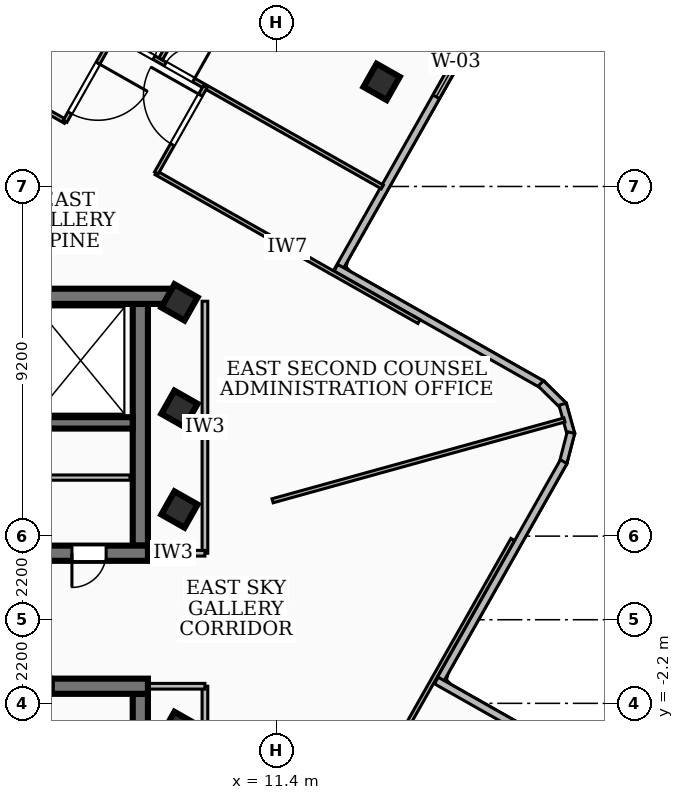
"""IFC4 building model, lengths in metres.
Left out: names, types, materials, properties, quantities, classifications, styles, units other than length and angle.
Written with IfcOpenShell. Run it as: python <this file> out.ifc"""

import sys

from ifc_helpers import new_model, si_unit, direction, frame, frame_2d, origin, origin_2d, place, context, subcontext, project, spatial, rectangle, extrude, element, fill, save


model = new_model("IFC4")
c1 = context("Model", 3, precision=1e-05, world=origin(), true_north=direction((0.0, 1.0)))
c2 = subcontext(c1, "Body", "Model", "MODEL_VIEW")
j1 = project(units=[si_unit("LENGTHUNIT", "METRE"), si_unit("PLANEANGLEUNIT", "RADIAN")], contexts=[c1])
p1 = place(None, origin())
s1 = spatial("IfcSite", under=j1, at=p1, CompositionType="ELEMENT")
p2 = place(p1, origin())
s2 = spatial("IfcBuilding", under=s1, at=p2, CompositionType="ELEMENT")
p3 = place(p2, frame((0.0, 0.0, 281.7)))
s3 = spatial("IfcBuildingStorey", under=s2, at=p3, CompositionType="ELEMENT", Elevation=281.7)
p4 = place(p3, frame((-8.78, 8.51, 0.0), z_axis=(0.0, 0.0, 1.0), x_axis=(1.0, 0.0, 0.0)))
e1 = element("IfcWall", 1, at=p4, inside=s3, PredefinedType="SHEAR", context=c2, shape_type="SweptSolid", body=[
    extrude(rectangle(XDim=17.56, YDim=0.4, at=frame_2d((8.78, 0.0))), origin(), (0.0, 0.0, 1.0), 3.12),
])
p5 = place(p3, frame((8.02, 1.75, 0.0), z_axis=(0.0, 0.0, 1.0), x_axis=(-1.0, 0.0, 0.0)))
e2 = element("IfcWall", 2, at=p5, inside=s3, PredefinedType="SHEAR", context=c2, shape_type="SweptSolid", body=[
    extrude(rectangle(XDim=16.04, YDim=0.4, at=frame_2d((8.02, 0.0))), origin(), (0.0, 0.0, 1.0), 3.12),
])
p6 = place(p5, frame((7.45, 0.0, 0.0)))
e3 = element("IfcOpeningElement", 3, at=p6, cuts=e2, PredefinedType="OPENING", context=c2, shape_type="SweptSolid", body=[
    extrude(rectangle(XDim=1.0, YDim=2.1, at=frame_2d((0.5, 1.05))), frame((0.0, 0.21, 0.0), z_axis=(0.0, -1.0, 0.0), x_axis=(1.0, 0.0, 0.0)), (0.0, 0.0, 1.0), 0.42),
])
p7 = place(p5, frame((14.285, 0.0, 0.0)))
e4 = element("IfcOpeningElement", 4, at=p7, cuts=e2, PredefinedType="OPENING", context=c2, shape_type="SweptSolid", body=[
    extrude(rectangle(XDim=1.05, YDim=2.15, at=frame_2d((0.525, 1.075))), frame((0.0, 0.21, 0.0), z_axis=(0.0, -1.0, 0.0), x_axis=(1.0, 0.0, 0.0)), (0.0, 0.0, 1.0), 0.42),
])
p8 = place(p5, frame((12.725, 0.0, 0.0)))
e5 = element("IfcOpeningElement", 5, at=p8, cuts=e2, PredefinedType="OPENING", context=c2, shape_type="SweptSolid", body=[
    extrude(rectangle(XDim=1.05, YDim=2.15, at=frame_2d((0.525, 1.075))), frame((0.0, 0.21, 0.0), z_axis=(0.0, -1.0, 0.0), x_axis=(1.0, 0.0, 0.0)), (0.0, 0.0, 1.0), 0.42),
])
p9 = place(p5, frame((11.165, 0.0, 0.0)))
e6 = element("IfcOpeningElement", 6, at=p9, cuts=e2, PredefinedType="OPENING", context=c2, shape_type="SweptSolid", body=[
    extrude(rectangle(XDim=1.05, YDim=2.15, at=frame_2d((0.525, 1.075))), frame((0.0, 0.21, 0.0), z_axis=(0.0, -1.0, 0.0), x_axis=(1.0, 0.0, 0.0)), (0.0, 0.0, 1.0), 0.42),
])
p10 = place(p5, frame((3.4, 0.0, 0.0)))
e7 = element("IfcOpeningElement", 7, at=p10, cuts=e2, PredefinedType="OPENING", context=c2, shape_type="SweptSolid", body=[
    extrude(rectangle(XDim=0.9, YDim=2.06, at=frame_2d((0.45, 1.03))), frame((0.0, 0.21, 0.0), z_axis=(0.0, -1.0, 0.0), x_axis=(1.0, 0.0, 0.0)), (0.0, 0.0, 1.0), 0.42),
])
p11 = place(p5, frame((1.1, 0.0, 0.0)))
e8 = element("IfcOpeningElement", 8, at=p11, cuts=e2, PredefinedType="OPENING", context=c2, shape_type="SweptSolid", body=[
    extrude(rectangle(XDim=0.9, YDim=2.06, at=frame_2d((0.45, 1.03))), frame((0.0, 0.21, 0.0), z_axis=(0.0, -1.0, 0.0), x_axis=(1.0, 0.0, 0.0)), (0.0, 0.0, 1.0), 0.42),
])
p12 = place(p3, frame((7.82, 8.31, 0.0), z_axis=(0.0, 0.0, 1.0), x_axis=(0.0, -1.0, 0.0)))
e9 = element("IfcWall", 9, at=p12, inside=s3, PredefinedType="SHEAR", context=c2, shape_type="SweptSolid", body=[
    extrude(rectangle(XDim=6.36, YDim=0.4, at=frame_2d((3.18, 0.0))), origin(), (0.0, 0.0, 1.0), 3.12),
])
p13 = place(p3, frame((7.62, 5.18, 0.0), z_axis=(0.0, 0.0, 1.0), x_axis=(-1.0, 0.0, 0.0)))
e10 = element("IfcWall", 10, at=p13, inside=s3, PredefinedType="SOLIDWALL", context=c2, shape_type="SweptSolid", body=[
    extrude(rectangle(XDim=15.24, YDim=0.3, at=frame_2d((7.62, 0.0))), origin(), (0.0, 0.0, 1.0), 3.12),
])
p14 = place(p13, frame((5.77, 0.0, 0.0)))
e11 = element("IfcOpeningElement", 11, at=p14, cuts=e10, PredefinedType="OPENING", context=c2, shape_type="SweptSolid", body=[
    extrude(rectangle(XDim=1.1, YDim=2.15, at=frame_2d((0.55, 1.075))), frame((0.0, 0.16, 0.0), z_axis=(0.0, -1.0, 0.0), x_axis=(1.0, 0.0, 0.0)), (0.0, 0.0, 1.0), 0.32),
])
p15 = place(p13, frame((2.97, 0.0, 0.0)))
e12 = element("IfcOpeningElement", 12, at=p15, cuts=e10, PredefinedType="OPENING", context=c2, shape_type="SweptSolid", body=[
    extrude(rectangle(XDim=1.1, YDim=2.15, at=frame_2d((0.55, 1.075))), frame((0.0, 0.16, 0.0), z_axis=(0.0, -1.0, 0.0), x_axis=(1.0, 0.0, 0.0)), (0.0, 0.0, 1.0), 0.32),
])
p16 = place(p13, frame((7.97, 0.0, 0.0)))
e13 = element("IfcOpeningElement", 13, at=p16, cuts=e10, PredefinedType="OPENING", context=c2, shape_type="SweptSolid", body=[
    extrude(rectangle(XDim=1.0, YDim=2.1, at=frame_2d((0.5, 1.05))), frame((0.0, 0.16, 0.0), z_axis=(0.0, -1.0, 0.0), x_axis=(1.0, 0.0, 0.0)), (0.0, 0.0, 1.0), 0.32),
])
p17 = place(p3, frame((-8.02, -1.75, 0.0), z_axis=(0.0, 0.0, 1.0), x_axis=(1.0, 0.0, 0.0)))
e14 = element("IfcWall", 14, at=p17, inside=s3, PredefinedType="SHEAR", context=c2, shape_type="SweptSolid", body=[
    extrude(rectangle(XDim=16.04, YDim=0.4, at=frame_2d((8.02, 0.0))), origin(), (0.0, 0.0, 1.0), 3.12),
])
p18 = place(p17, frame((7.45, 0.0, 0.0)))
e15 = element("IfcOpeningElement", 15, at=p18, cuts=e14, PredefinedType="OPENING", context=c2, shape_type="SweptSolid", body=[
    extrude(rectangle(XDim=1.0, YDim=2.1, at=frame_2d((0.5, 1.05))), frame((0.0, 0.21, 0.0), z_axis=(0.0, -1.0, 0.0), x_axis=(1.0, 0.0, 0.0)), (0.0, 0.0, 1.0), 0.42),
])
p19 = place(p17, frame((12.65, 0.0, 0.0)))
e16 = element("IfcOpeningElement", 16, at=p19, cuts=e14, PredefinedType="OPENING", context=c2, shape_type="SweptSolid", body=[
    extrude(rectangle(XDim=0.9, YDim=2.06, at=frame_2d((0.45, 1.03))), frame((0.0, 0.21, 0.0), z_axis=(0.0, -1.0, 0.0), x_axis=(1.0, 0.0, 0.0)), (0.0, 0.0, 1.0), 0.42),
])
p20 = place(p17, frame((2.25, 0.0, 0.0)))
e17 = element("IfcOpeningElement", 17, at=p20, cuts=e14, PredefinedType="OPENING", context=c2, shape_type="SweptSolid", body=[
    extrude(rectangle(XDim=0.9, YDim=2.06, at=frame_2d((0.45, 1.03))), frame((0.0, 0.21, 0.0), z_axis=(0.0, -1.0, 0.0), x_axis=(1.0, 0.0, 0.0)), (0.0, 0.0, 1.0), 0.42),
])
p21 = place(p3, frame((7.82, -1.95, 0.0), z_axis=(0.0, 0.0, 1.0), x_axis=(0.0, -1.0, 0.0)))
e18 = element("IfcWall", 18, at=p21, inside=s3, PredefinedType="SHEAR", context=c2, shape_type="SweptSolid", body=[
    extrude(rectangle(XDim=6.36, YDim=0.4, at=frame_2d((3.18, 0.0))), origin(), (0.0, 0.0, 1.0), 3.12),
])
for number, where, z_axis, x_axis in (
    (19, (8.85, -2.9, 0.0), (0.0, 0.0, 1.0), (0.493, 0.87, 0.0)),
    (20, (8.85, 2.9, 0.0), (0.0, 0.0, 1.0), (0.493, 0.87, 0.0)),
    (21, (8.85, 5.55, 0.0), (0.0, 0.0, 1.0), (0.493, 0.87, 0.0)),
    (22, (8.85, 8.35, 0.0), (0.0, 0.0, 1.0), (0.493, 0.87, 0.0)),
    (23, (14.169, 14.152, 0.0), (0.0, 0.0, 1.0), (0.493, 0.87, 0.0)),
):
    element("IfcColumn", number, at=place(p3, frame(where, z_axis=z_axis, x_axis=x_axis)), inside=s3, PredefinedType="COLUMN", context=c2, shape_type="SweptSolid", body=[
        extrude(rectangle(XDim=0.7, YDim=0.7, at=origin_2d()), origin(), (0.0, 0.0, 1.0), 3.42),
    ])
p22 = place(p3, frame((17.058, 16.326, 0.0), z_axis=(0.0, 0.0, 1.0), x_axis=(-0.492504245901, -0.870310041175, 0.0)))
e24 = element("IfcWall", 24, at=p22, inside=s3, PredefinedType="SOLIDWALL", context=c2, shape_type="SweptSolid", body=[
    extrude(rectangle(XDim=8.242, YDim=0.2, at=frame_2d((4.121, 0.0))), origin(), (0.0, 0.0, 1.0), 3.12),
])
p23 = place(p22, frame((0.85, 0.0, 0.85)))
e25 = element("IfcOpeningElement", 25, at=p23, cuts=e24, PredefinedType="OPENING", context=c2, shape_type="SweptSolid", body=[
    extrude(rectangle(XDim=2.1, YDim=2.0, at=frame_2d((1.05, 1.0))), frame((0.0, 0.11, 0.0), z_axis=(0.0, -1.0, 0.0), x_axis=(1.0, 0.0, 0.0)), (0.0, 0.0, 1.0), 0.22),
])
p24 = place(p3, frame((12.968, 9.262, 0.0), z_axis=(0.0, 0.0, 1.0), x_axis=(0.87026539867, -0.492583125855, 0.0)))
e26 = element("IfcWall", 26, at=p24, inside=s3, PredefinedType="SOLIDWALL", context=c2, shape_type="SweptSolid", body=[
    extrude(rectangle(XDim=6.24, YDim=0.2, at=frame_2d((3.12, 0.0))), origin(), (0.0, 0.0, 1.0), 3.12),
])
p25 = place(p3, frame((18.359, 6.218, 0.0), z_axis=(0.0, 0.0, 1.0), x_axis=(0.712466161804, -0.701706468749, 0.0)))
e27 = element("IfcWall", 27, at=p25, inside=s3, PredefinedType="SOLIDWALL", context=c2, shape_type="SweptSolid", body=[
    extrude(rectangle(XDim=0.84, YDim=0.2, at=frame_2d((0.42, 0.0))), origin(), (0.0, 0.0, 1.0), 3.12),
])
p26 = place(p3, frame((18.932, 5.671, 0.0), z_axis=(0.0, 0.0, 1.0), x_axis=(0.268377126675, -0.963313924885, 0.0)))
e28 = element("IfcWall", 28, at=p26, inside=s3, PredefinedType="SOLIDWALL", context=c2, shape_type="SweptSolid", body=[
    extrude(rectangle(XDim=0.824, YDim=0.2, at=frame_2d((0.412, 0.0))), origin(), (0.0, 0.0, 1.0), 3.12),
])
p27 = place(p3, frame((19.152, 4.925, 0.0), z_axis=(0.0, 0.0, 1.0), x_axis=(-0.250891369276, -0.968015248239, 0.0)))
e29 = element("IfcWall", 29, at=p27, inside=s3, PredefinedType="SOLIDWALL", context=c2, shape_type="SweptSolid", body=[
    extrude(rectangle(XDim=0.838, YDim=0.2, at=frame_2d((0.419, 0.0))), origin(), (0.0, 0.0, 1.0), 3.12),
])
p28 = place(p3, frame((18.96, 4.16, 0.0), z_axis=(0.0, 0.0, 1.0), x_axis=(-0.492441425139, -0.870345588147, 0.0)))
e30 = element("IfcWall", 30, at=p28, inside=s3, PredefinedType="SOLIDWALL", context=c2, shape_type="SweptSolid", body=[
    extrude(rectangle(XDim=6.742, YDim=0.2, at=frame_2d((3.371, 0.0))), origin(), (0.0, 0.0, 1.0), 3.12),
])
p29 = place(p3, frame((15.609, -1.599, 0.0), z_axis=(0.0, 0.0, 1.0), x_axis=(0.87036421417, -0.49240850388, 0.0)))
e31 = element("IfcWall", 31, at=p29, inside=s3, PredefinedType="SOLIDWALL", context=c2, shape_type="SweptSolid", body=[
    extrude(rectangle(XDim=3.641, YDim=0.2, at=frame_2d((1.821, 0.0))), origin(), (0.0, 0.0, 1.0), 3.12),
])
p30 = place(p3, frame((2.9, 3.74, 0.0), z_axis=(0.0, 0.0, 1.0), x_axis=(1.0, 0.0, 0.0)))
e32 = element("IfcWall", 32, at=p30, inside=s3, PredefinedType="PARTITIONING", context=c2, shape_type="SweptSolid", body=[
    extrude(rectangle(XDim=4.65, YDim=0.138, at=frame_2d((2.325, 0.0))), origin(), (0.0, 0.0, 1.0), 3.12),
])
p31 = place(p3, frame((9.52, 1.75, 0.0), z_axis=(0.0, 0.0, 1.0), x_axis=(0.0, 1.0, 0.0)))
e33 = element("IfcWall", 33, at=p31, inside=s3, PredefinedType="PARTITIONING", context=c2, shape_type="SweptSolid", body=[
    extrude(rectangle(XDim=6.63, YDim=0.15, at=frame_2d((3.315, 0.0))), origin(), (0.0, 0.0, 1.0), 3.12),
])
p32 = place(p3, frame((7.85, 1.75, 0.0), z_axis=(0.0, 0.0, 1.0), x_axis=(1.0, 0.0, 0.0)))
e34 = element("IfcWall", 34, at=p32, inside=s3, PredefinedType="PARTITIONING", context=c2, shape_type="SweptSolid", body=[
    extrude(rectangle(XDim=1.67, YDim=0.15, at=frame_2d((0.835, 0.0))), origin(), (0.0, 0.0, 1.0), 2.35),
])
p33 = place(p3, frame((9.52, -8.38, 0.0), z_axis=(0.0, 0.0, 1.0), x_axis=(0.0, 1.0, 0.0)))
e35 = element("IfcWall", 35, at=p33, inside=s3, PredefinedType="PARTITIONING", context=c2, shape_type="SweptSolid", body=[
    extrude(rectangle(XDim=6.63, YDim=0.15, at=frame_2d((3.315, 0.0))), origin(), (0.0, 0.0, 1.0), 2.49),
])
p34 = place(p3, frame((7.85, -1.75, 0.0), z_axis=(0.0, 0.0, 1.0), x_axis=(1.0, 0.0, 0.0)))
e36 = element("IfcWall", 36, at=p34, inside=s3, PredefinedType="PARTITIONING", context=c2, shape_type="SweptSolid", body=[
    extrude(rectangle(XDim=1.67, YDim=0.15, at=frame_2d((0.835, 0.0))), origin(), (0.0, 0.0, 1.0), 2.35),
])
p35 = place(p3, frame((11.3, 3.13, 0.0), z_axis=(0.0, 0.0, 1.0), x_axis=(0.963747113025, 0.26681735726, 0.0)))
e37 = element("IfcWall", 37, at=p35, inside=s3, PredefinedType="PARTITIONING", context=c2, shape_type="SweptSolid", body=[
    extrude(rectangle(XDim=7.969, YDim=0.11, at=frame_2d((3.984, 0.0))), origin(), (0.0, 0.0, 1.0), 3.12),
])
p36 = place(p3, frame((5.849, 13.11, 0.0), z_axis=(0.0, 0.0, 1.0), x_axis=(-0.870169207172, 0.49275303235, 0.0)))
e38 = element("IfcWall", 38, at=p36, inside=s3, PredefinedType="PARTITIONING", context=c2, shape_type="SweptSolid", body=[
    extrude(rectangle(XDim=8.45, YDim=0.11, at=frame_2d((4.225, 0.0))), origin(), (0.0, 0.0, 1.0), 3.12),
])
p37 = place(p3, frame((15.152, 7.843, 0.0), z_axis=(0.0, 0.0, 1.0), x_axis=(-0.87023152106, 0.492642973921, 0.0)))
e39 = element("IfcWall", 39, at=p37, inside=s3, PredefinedType="PARTITIONING", context=c2, shape_type="SweptSolid", body=[
    extrude(rectangle(XDim=7.951, YDim=0.11, at=frame_2d((3.976, 0.0))), origin(), (0.0, 0.0, 1.0), 2.49),
])
p38 = place(p3, frame((7.126, 15.386, 0.0), z_axis=(0.0, 0.0, 1.0), x_axis=(-0.492719860856, -0.870187990447, 0.0)))
e40 = element("IfcWall", 40, at=p38, inside=s3, PredefinedType="PARTITIONING", context=c2, shape_type="SweptSolid", body=[
    extrude(rectangle(XDim=2.61, YDim=0.11, at=frame_2d((1.305, 0.0))), origin(), (0.0, 0.0, 1.0), 3.12),
])
p39 = place(p38, frame((0.855, 0.0, 0.0)))
e41 = element("IfcOpeningElement", 41, at=p39, cuts=e40, PredefinedType="OPENING", context=c2, shape_type="SweptSolid", body=[
    extrude(rectangle(XDim=1.5, YDim=2.12, at=frame_2d((0.75, 1.06))), frame((0.0, 0.065, 0.0), z_axis=(0.0, -1.0, 0.0), x_axis=(1.0, 0.0, 0.0)), (0.0, 0.0, 1.0), 0.13),
])
p40 = place(p3, frame((8.242, 11.755, 0.0), z_axis=(0.0, 0.0, 1.0), x_axis=(0.492790693409, 0.870147879667, 0.0)))
e42 = element("IfcWall", 42, at=p40, inside=s3, PredefinedType="PARTITIONING", context=c2, shape_type="SweptSolid", body=[
    extrude(rectangle(XDim=2.61, YDim=0.11, at=frame_2d((1.305, 0.0))), origin(), (0.0, 0.0, 1.0), 2.49),
])
p41 = place(p40, frame((0.855, 0.0, 0.0)))
e43 = element("IfcOpeningElement", 43, at=p41, cuts=e42, PredefinedType="OPENING", context=c2, shape_type="SweptSolid", body=[
    extrude(rectangle(XDim=1.5, YDim=2.12, at=frame_2d((0.75, 1.06))), frame((0.0, 0.065, 0.0), z_axis=(0.0, -1.0, 0.0), x_axis=(1.0, 0.0, 0.0)), (0.0, 0.0, 1.0), 0.13),
])
p42 = place(p3, frame((8.357, 14.758, 0.0), z_axis=(0.0, 0.0, 1.0), x_axis=(0.492600685366, 0.870255459493, 0.0)))
e44 = element("IfcWall", 44, at=p42, inside=s3, PredefinedType="PARTITIONING", context=c2, shape_type="SweptSolid", body=[
    extrude(rectangle(XDim=7.075, YDim=0.11, at=frame_2d((3.538, 0.0))), origin(), (0.0, 0.0, 1.0), 2.49),
])
p43 = place(p3, frame((2.902, 17.778, 0.0), z_axis=(0.0, 0.0, 1.0), x_axis=(0.870194117035, -0.492709040588, 0.0)))
e45 = element("IfcWall", 45, at=p43, inside=s3, PredefinedType="PARTITIONING", context=c2, shape_type="SweptSolid", body=[
    extrude(rectangle(XDim=12.969, YDim=0.11, at=frame_2d((6.485, 0.0))), origin(), (0.0, 0.0, 1.0), 2.49),
])
p44 = place(p43, frame((6.405, 0.0, 0.0)))
e46 = element("IfcOpeningElement", 46, at=p44, cuts=e45, PredefinedType="OPENING", context=c2, shape_type="SweptSolid", body=[
    extrude(rectangle(XDim=0.86, YDim=2.04, at=frame_2d((0.43, 1.02))), frame((0.0, 0.065, 0.0), z_axis=(0.0, -1.0, 0.0), x_axis=(1.0, 0.0, 0.0)), (0.0, 0.0, 1.0), 0.13),
])
p45 = place(p43, frame((5.205, 0.0, 0.0)))
e47 = element("IfcOpeningElement", 47, at=p45, cuts=e45, PredefinedType="OPENING", context=c2, shape_type="SweptSolid", body=[
    extrude(rectangle(XDim=0.86, YDim=2.04, at=frame_2d((0.43, 1.02))), frame((0.0, 0.065, 0.0), z_axis=(0.0, -1.0, 0.0), x_axis=(1.0, 0.0, 0.0)), (0.0, 0.0, 1.0), 0.13),
])
p46 = place(p3, frame((17.619, 2.113, 0.0), z_axis=(0.0, 0.0, 1.0), x_axis=(-0.492746831558, -0.870172718482, 0.0)))
e48 = element("IfcWall", 48, at=p46, inside=s3, PredefinedType="PARTITIONING", context=c2, shape_type="SweptSolid", body=[
    extrude(rectangle(XDim=20.54, YDim=0.11, at=frame_2d((10.27, 0.0))), origin(), (0.0, 0.0, 1.0), 2.49),
])
p47 = place(p46, frame((11.36, 0.0, 0.0)))
e49 = element("IfcOpeningElement", 49, at=p47, cuts=e48, PredefinedType="OPENING", context=c2, shape_type="SweptSolid", body=[
    extrude(rectangle(XDim=0.86, YDim=2.04, at=frame_2d((0.43, 1.02))), frame((0.0, 0.065, 0.0), z_axis=(0.0, -1.0, 0.0), x_axis=(1.0, 0.0, 0.0)), (0.0, 0.0, 1.0), 0.13),
])
p48 = place(p46, frame((9.92, 0.0, 0.0)))
e50 = element("IfcOpeningElement", 50, at=p48, cuts=e48, PredefinedType="OPENING", context=c2, shape_type="SweptSolid", body=[
    extrude(rectangle(XDim=0.86, YDim=2.04, at=frame_2d((0.43, 1.02))), frame((0.0, 0.065, 0.0), z_axis=(0.0, -1.0, 0.0), x_axis=(1.0, 0.0, 0.0)), (0.0, 0.0, 1.0), 0.13),
])
p49 = place(p23, origin())
e51 = element("IfcWindow", 51, at=p49, inside=s3, PartitioningType="SINGLE_PANEL", PredefinedType="WINDOW", context=c2, shape_type="SweptSolid", body=[
    extrude(rectangle(XDim=2.1, YDim=2.0, at=frame_2d((1.05, 1.0))), frame((0.0, 0.03, 0.0), z_axis=(0.0, -1.0, 0.0), x_axis=(1.0, 0.0, 0.0)), (0.0, 0.0, 1.0), 0.06),
])
fill(e25, e51)
p50 = place(p19, origin())
e52 = element("IfcDoor", 52, at=p50, inside=s3, OperationType="SINGLE_SWING_LEFT", PredefinedType="DOOR", context=c2, shape_type="SweptSolid", body=[
    extrude(rectangle(XDim=0.9, YDim=2.06, at=frame_2d((0.45, 1.03))), frame((0.0, 0.025, 0.0), z_axis=(0.0, -1.0, 0.0), x_axis=(1.0, 0.0, 0.0)), (0.0, 0.0, 1.0), 0.05),
])
fill(e16, e52)
p51 = place(p11, origin())
e53 = element("IfcDoor", 53, at=p51, inside=s3, OperationType="SINGLE_SWING_RIGHT", PredefinedType="DOOR", context=c2, shape_type="SweptSolid", body=[
    extrude(rectangle(XDim=0.9, YDim=2.06, at=frame_2d((0.45, 1.03))), frame((0.0, 0.025, 0.0), z_axis=(0.0, -1.0, 0.0), x_axis=(1.0, 0.0, 0.0)), (0.0, 0.0, 1.0), 0.05),
])
fill(e8, e53)
p52 = place(p39, origin())
e54 = element("IfcDoor", 54, at=p52, inside=s3, OperationType="SINGLE_SWING_LEFT", PredefinedType="DOOR", context=c2, shape_type="SweptSolid", body=[
    extrude(rectangle(XDim=1.5, YDim=2.12, at=frame_2d((0.75, 1.06))), frame((0.0, 0.025, 0.0), z_axis=(0.0, -1.0, 0.0), x_axis=(1.0, 0.0, 0.0)), (0.0, 0.0, 1.0), 0.05),
])
fill(e41, e54)
p53 = place(p41, origin())
e55 = element("IfcDoor", 55, at=p53, inside=s3, OperationType="SINGLE_SWING_RIGHT", PredefinedType="DOOR", context=c2, shape_type="SweptSolid", body=[
    extrude(rectangle(XDim=1.5, YDim=2.12, at=frame_2d((0.75, 1.06))), frame((0.0, 0.025, 0.0), z_axis=(0.0, -1.0, 0.0), x_axis=(1.0, 0.0, 0.0)), (0.0, 0.0, 1.0), 0.05),
])
fill(e43, e55)
p54 = place(p44, origin())
e56 = element("IfcDoor", 56, at=p54, inside=s3, OperationType="SINGLE_SWING_RIGHT", PredefinedType="DOOR", context=c2, shape_type="SweptSolid", body=[
    extrude(rectangle(XDim=0.86, YDim=2.04, at=frame_2d((0.43, 1.02))), frame((0.0, 0.025, 0.0), z_axis=(0.0, -1.0, 0.0), x_axis=(1.0, 0.0, 0.0)), (0.0, 0.0, 1.0), 0.05),
])
fill(e46, e56)
p55 = place(p45, origin())
e57 = element("IfcDoor", 57, at=p55, inside=s3, OperationType="SINGLE_SWING_LEFT", PredefinedType="DOOR", context=c2, shape_type="SweptSolid", body=[
    extrude(rectangle(XDim=0.86, YDim=2.04, at=frame_2d((0.43, 1.02))), frame((0.0, 0.025, 0.0), z_axis=(0.0, -1.0, 0.0), x_axis=(1.0, 0.0, 0.0)), (0.0, 0.0, 1.0), 0.05),
])
fill(e47, e57)
save(model, sys.argv[1])
